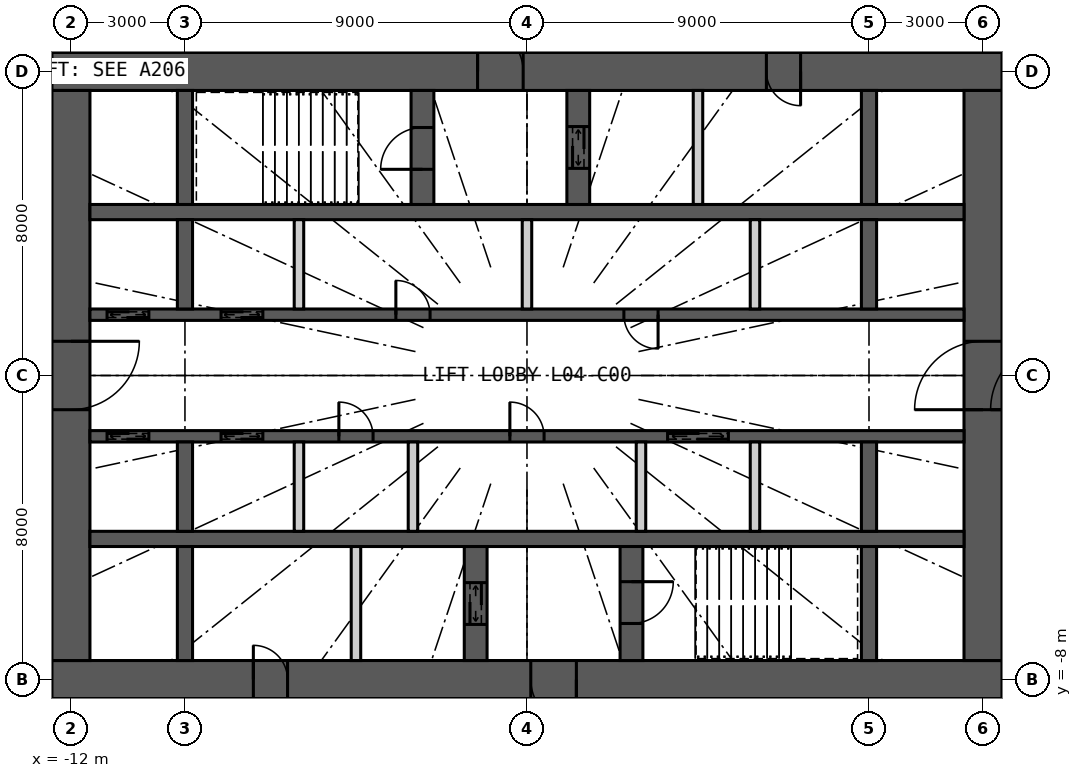
"""IFC4 building model, lengths in metres.
Left out: names, types, materials, properties, quantities, classifications, styles, units other than length and angle.
Written with IfcOpenShell. Run it as: python <this file> out.ifc"""

import sys

from ifc_helpers import new_model, si_unit, direction, frame, frame_2d, origin, place, context, subcontext, project, spatial, rectangle, extrude, element, fill, save


model = new_model("IFC4")
c1 = context("Model", 3, precision=1e-05, world=origin(), true_north=direction((0.0, 1.0)))
c2 = subcontext(c1, "Body", "Model", "MODEL_VIEW")
j1 = project(units=[si_unit("LENGTHUNIT", "METRE"), si_unit("PLANEANGLEUNIT", "RADIAN")], contexts=[c1])
p1 = place(None, origin())
s1 = spatial("IfcSite", under=j1, at=p1, CompositionType="ELEMENT")
p2 = place(p1, origin())
s2 = spatial("IfcBuilding", under=s1, at=p2, CompositionType="ELEMENT")
p3 = place(p2, frame((0.0, 0.0, 24.6)))
s3 = spatial("IfcBuildingStorey", under=s2, at=p3, CompositionType="ELEMENT", Elevation=24.6)
p4 = place(p3, frame((-12.5, 8.0, 0.0), z_axis=(0.0, 0.0, 1.0), x_axis=(1.0, 0.0, 0.0)))
e1 = element("IfcWall", 1, at=p4, inside=s3, PredefinedType="SHEAR", context=c2, shape_type="SweptSolid", body=[
    extrude(rectangle(XDim=25.0, YDim=1.0, at=frame_2d((12.5, 0.0))), origin(), (0.0, 0.0, 1.0), 4.8),
])
p5 = place(p4, frame((11.2, 0.0, 0.0)))
e2 = element("IfcOpeningElement", 2, at=p5, cuts=e1, PredefinedType="OPENING", context=c2, shape_type="SweptSolid", body=[
    extrude(rectangle(XDim=1.2, YDim=2.2, at=frame_2d((0.6, 1.1))), frame((0.0, 0.51, 0.0), z_axis=(0.0, -1.0, 0.0), x_axis=(1.0, 0.0, 0.0)), (0.0, 0.0, 1.0), 1.02),
])
p6 = place(p4, frame((18.8, 0.0, 0.0)))
e3 = element("IfcOpeningElement", 3, at=p6, cuts=e1, PredefinedType="OPENING", context=c2, shape_type="SweptSolid", body=[
    extrude(rectangle(XDim=0.9, YDim=2.2, at=frame_2d((0.45, 1.1))), frame((0.0, 0.51, 0.0), z_axis=(0.0, -1.0, 0.0), x_axis=(1.0, 0.0, 0.0)), (0.0, 0.0, 1.0), 1.02),
])
p7 = place(p3, frame((12.5, -8.0, 0.0), z_axis=(0.0, 0.0, 1.0), x_axis=(-1.0, 0.0, 0.0)))
e4 = element("IfcWall", 4, at=p7, inside=s3, PredefinedType="SHEAR", context=c2, shape_type="SweptSolid", body=[
    extrude(rectangle(XDim=25.0, YDim=1.0, at=frame_2d((12.5, 0.0))), origin(), (0.0, 0.0, 1.0), 4.8),
])
p8 = place(p7, frame((11.2, 0.0, 0.0)))
e5 = element("IfcOpeningElement", 5, at=p8, cuts=e4, PredefinedType="OPENING", context=c2, shape_type="SweptSolid", body=[
    extrude(rectangle(XDim=1.2, YDim=2.2, at=frame_2d((0.6, 1.1))), frame((0.0, 0.51, 0.0), z_axis=(0.0, -1.0, 0.0), x_axis=(1.0, 0.0, 0.0)), (0.0, 0.0, 1.0), 1.02),
])
p9 = place(p7, frame((18.8, 0.0, 0.0)))
e6 = element("IfcOpeningElement", 6, at=p9, cuts=e4, PredefinedType="OPENING", context=c2, shape_type="SweptSolid", body=[
    extrude(rectangle(XDim=0.9, YDim=2.2, at=frame_2d((0.45, 1.1))), frame((0.0, 0.51, 0.0), z_axis=(0.0, -1.0, 0.0), x_axis=(1.0, 0.0, 0.0)), (0.0, 0.0, 1.0), 1.02),
])
p10 = place(p3, frame((12.0, -7.5, 0.0), z_axis=(0.0, 0.0, 1.0), x_axis=(0.0, 1.0, 0.0)))
e7 = element("IfcWall", 7, at=p10, inside=s3, PredefinedType="SHEAR", context=c2, shape_type="SweptSolid", body=[
    extrude(rectangle(XDim=15.0, YDim=1.0, at=frame_2d((7.5, 0.0))), origin(), (0.0, 0.0, 1.0), 4.8),
])
p11 = place(p10, frame((6.6, 0.0, 0.0)))
e8 = element("IfcOpeningElement", 8, at=p11, cuts=e7, PredefinedType="OPENING", context=c2, shape_type="SweptSolid", body=[
    extrude(rectangle(XDim=1.8, YDim=2.2, at=frame_2d((0.9, 1.1))), frame((0.0, 0.51, 0.0), z_axis=(0.0, -1.0, 0.0), x_axis=(1.0, 0.0, 0.0)), (0.0, 0.0, 1.0), 1.02),
])
p12 = place(p3, frame((-12.0, 7.5, 0.0), z_axis=(0.0, 0.0, 1.0), x_axis=(0.0, -1.0, 0.0)))
e9 = element("IfcWall", 9, at=p12, inside=s3, PredefinedType="SHEAR", context=c2, shape_type="SweptSolid", body=[
    extrude(rectangle(XDim=15.0, YDim=1.0, at=frame_2d((7.5, 0.0))), origin(), (0.0, 0.0, 1.0), 4.8),
])
p13 = place(p12, frame((6.6, 0.0, 0.0)))
e10 = element("IfcOpeningElement", 10, at=p13, cuts=e9, PredefinedType="OPENING", context=c2, shape_type="SweptSolid", body=[
    extrude(rectangle(XDim=1.8, YDim=2.2, at=frame_2d((0.9, 1.1))), frame((0.0, 0.51, 0.0), z_axis=(0.0, -1.0, 0.0), x_axis=(1.0, 0.0, 0.0)), (0.0, 0.0, 1.0), 1.02),
])
p14 = place(p3, frame((-11.5, 4.3, 0.0), z_axis=(0.0, 0.0, 1.0), x_axis=(1.0, 0.0, 0.0)))
e11 = element("IfcWall", 11, at=p14, inside=s3, PredefinedType="SHEAR", context=c2, shape_type="SweptSolid", body=[
    extrude(rectangle(XDim=23.0, YDim=0.4, at=frame_2d((11.5, 0.0))), origin(), (0.0, 0.0, 1.0), 4.8),
])
p15 = place(p3, frame((-11.5, 1.6, 0.0), z_axis=(0.0, 0.0, 1.0), x_axis=(1.0, 0.0, 0.0)))
e12 = element("IfcWall", 12, at=p15, inside=s3, PredefinedType="SHEAR", context=c2, shape_type="SweptSolid", body=[
    extrude(rectangle(XDim=23.0, YDim=0.3, at=frame_2d((11.5, 0.0))), origin(), (0.0, 0.0, 1.0), 4.8),
])
p16 = place(p15, frame((0.45, 0.0, 0.0)))
e13 = element("IfcOpeningElement", 13, at=p16, cuts=e12, PredefinedType="OPENING", context=c2, shape_type="SweptSolid", body=[
    extrude(rectangle(XDim=1.1, YDim=2.2, at=frame_2d((0.55, 1.1))), frame((0.0, 0.16, 0.0), z_axis=(0.0, -1.0, 0.0), x_axis=(1.0, 0.0, 0.0)), (0.0, 0.0, 1.0), 0.32),
])
p17 = place(p15, frame((3.45, 0.0, 0.0)))
e14 = element("IfcOpeningElement", 14, at=p17, cuts=e12, PredefinedType="OPENING", context=c2, shape_type="SweptSolid", body=[
    extrude(rectangle(XDim=1.1, YDim=2.2, at=frame_2d((0.55, 1.1))), frame((0.0, 0.16, 0.0), z_axis=(0.0, -1.0, 0.0), x_axis=(1.0, 0.0, 0.0)), (0.0, 0.0, 1.0), 0.32),
])
p18 = place(p15, frame((8.05, 0.0, 0.0)))
e15 = element("IfcOpeningElement", 15, at=p18, cuts=e12, PredefinedType="OPENING", context=c2, shape_type="SweptSolid", body=[
    extrude(rectangle(XDim=0.9, YDim=2.2, at=frame_2d((0.45, 1.1))), frame((0.0, 0.16, 0.0), z_axis=(0.0, -1.0, 0.0), x_axis=(1.0, 0.0, 0.0)), (0.0, 0.0, 1.0), 0.32),
])
p19 = place(p15, frame((14.05, 0.0, 0.0)))
e16 = element("IfcOpeningElement", 16, at=p19, cuts=e12, PredefinedType="OPENING", context=c2, shape_type="SweptSolid", body=[
    extrude(rectangle(XDim=0.9, YDim=2.2, at=frame_2d((0.45, 1.1))), frame((0.0, 0.16, 0.0), z_axis=(0.0, -1.0, 0.0), x_axis=(1.0, 0.0, 0.0)), (0.0, 0.0, 1.0), 0.32),
])
p20 = place(p3, frame((-11.5, -4.3, 0.0), z_axis=(0.0, 0.0, 1.0), x_axis=(1.0, 0.0, 0.0)))
e17 = element("IfcWall", 17, at=p20, inside=s3, PredefinedType="SHEAR", context=c2, shape_type="SweptSolid", body=[
    extrude(rectangle(XDim=23.0, YDim=0.4, at=frame_2d((11.5, 0.0))), origin(), (0.0, 0.0, 1.0), 4.8),
])
p21 = place(p3, frame((-11.5, -1.6, 0.0), z_axis=(0.0, 0.0, 1.0), x_axis=(1.0, 0.0, 0.0)))
e18 = element("IfcWall", 18, at=p21, inside=s3, PredefinedType="SHEAR", context=c2, shape_type="SweptSolid", body=[
    extrude(rectangle(XDim=23.0, YDim=0.3, at=frame_2d((11.5, 0.0))), origin(), (0.0, 0.0, 1.0), 4.8),
])
p22 = place(p21, frame((0.45, 0.0, 0.0)))
e19 = element("IfcOpeningElement", 19, at=p22, cuts=e18, PredefinedType="OPENING", context=c2, shape_type="SweptSolid", body=[
    extrude(rectangle(XDim=1.1, YDim=2.2, at=frame_2d((0.55, 1.1))), frame((0.0, 0.16, 0.0), z_axis=(0.0, -1.0, 0.0), x_axis=(1.0, 0.0, 0.0)), (0.0, 0.0, 1.0), 0.32),
])
p23 = place(p21, frame((3.45, 0.0, 0.0)))
e20 = element("IfcOpeningElement", 20, at=p23, cuts=e18, PredefinedType="OPENING", context=c2, shape_type="SweptSolid", body=[
    extrude(rectangle(XDim=1.1, YDim=2.2, at=frame_2d((0.55, 1.1))), frame((0.0, 0.16, 0.0), z_axis=(0.0, -1.0, 0.0), x_axis=(1.0, 0.0, 0.0)), (0.0, 0.0, 1.0), 0.32),
])
p24 = place(p21, frame((15.2, 0.0, 0.0)))
e21 = element("IfcOpeningElement", 21, at=p24, cuts=e18, PredefinedType="OPENING", context=c2, shape_type="SweptSolid", body=[
    extrude(rectangle(XDim=1.6, YDim=2.4, at=frame_2d((0.8, 1.2))), frame((0.0, 0.16, 0.0), z_axis=(0.0, -1.0, 0.0), x_axis=(1.0, 0.0, 0.0)), (0.0, 0.0, 1.0), 0.32),
])
p25 = place(p21, frame((6.55, 0.0, 0.0)))
e22 = element("IfcOpeningElement", 22, at=p25, cuts=e18, PredefinedType="OPENING", context=c2, shape_type="SweptSolid", body=[
    extrude(rectangle(XDim=0.9, YDim=2.2, at=frame_2d((0.45, 1.1))), frame((0.0, 0.16, 0.0), z_axis=(0.0, -1.0, 0.0), x_axis=(1.0, 0.0, 0.0)), (0.0, 0.0, 1.0), 0.32),
])
p26 = place(p21, frame((11.05, 0.0, 0.0)))
e23 = element("IfcOpeningElement", 23, at=p26, cuts=e18, PredefinedType="OPENING", context=c2, shape_type="SweptSolid", body=[
    extrude(rectangle(XDim=0.9, YDim=2.2, at=frame_2d((0.45, 1.1))), frame((0.0, 0.16, 0.0), z_axis=(0.0, -1.0, 0.0), x_axis=(1.0, 0.0, 0.0)), (0.0, 0.0, 1.0), 0.32),
])
p27 = place(p3, frame((-9.0, 4.5, 0.0), z_axis=(0.0, 0.0, 1.0), x_axis=(0.0, 1.0, 0.0)))
e24 = element("IfcWall", 24, at=p27, inside=s3, PredefinedType="SHEAR", context=c2, shape_type="SweptSolid", body=[
    extrude(rectangle(XDim=3.0, YDim=0.4, at=frame_2d((1.5, 0.0))), origin(), (0.0, 0.0, 1.0), 4.8),
])
for number, where, z_axis, x_axis in (
    (25, (-9.0, 1.75, 0.0), (0.0, 0.0, 1.0), (0.0, 1.0, 0.0)),
    (26, (-9.0, -4.1, 0.0), (0.0, 0.0, 1.0), (0.0, 1.0, 0.0)),
):
    element("IfcWall", number, at=place(p3, frame(where, z_axis=z_axis, x_axis=x_axis)), inside=s3, PredefinedType="SHEAR", context=c2, shape_type="SweptSolid", body=[
        extrude(rectangle(XDim=2.35, YDim=0.4, at=frame_2d((1.175, 0.0))), origin(), (0.0, 0.0, 1.0), 4.8),
    ])
for number, where, z_axis, x_axis in (
    (27, (-9.0, -7.5, 0.0), (0.0, 0.0, 1.0), (0.0, 1.0, 0.0)),
    (28, (9.0, 4.5, 0.0), (0.0, 0.0, 1.0), (0.0, 1.0, 0.0)),
):
    element("IfcWall", number, at=place(p3, frame(where, z_axis=z_axis, x_axis=x_axis)), inside=s3, PredefinedType="SHEAR", context=c2, shape_type="SweptSolid", body=[
        extrude(rectangle(XDim=3.0, YDim=0.4, at=frame_2d((1.5, 0.0))), origin(), (0.0, 0.0, 1.0), 4.8),
    ])
for number, where, z_axis, x_axis in (
    (29, (9.0, 1.75, 0.0), (0.0, 0.0, 1.0), (0.0, 1.0, 0.0)),
    (30, (9.0, -4.1, 0.0), (0.0, 0.0, 1.0), (0.0, 1.0, 0.0)),
):
    element("IfcWall", number, at=place(p3, frame(where, z_axis=z_axis, x_axis=x_axis)), inside=s3, PredefinedType="SHEAR", context=c2, shape_type="SweptSolid", body=[
        extrude(rectangle(XDim=2.35, YDim=0.4, at=frame_2d((1.175, 0.0))), origin(), (0.0, 0.0, 1.0), 4.8),
    ])
p28 = place(p3, frame((9.0, -7.5, 0.0), z_axis=(0.0, 0.0, 1.0), x_axis=(0.0, 1.0, 0.0)))
e31 = element("IfcWall", 31, at=p28, inside=s3, PredefinedType="SHEAR", context=c2, shape_type="SweptSolid", body=[
    extrude(rectangle(XDim=3.0, YDim=0.4, at=frame_2d((1.5, 0.0))), origin(), (0.0, 0.0, 1.0), 4.8),
])
p29 = place(p3, frame((-2.75, 4.5, 0.0), z_axis=(0.0, 0.0, 1.0), x_axis=(0.0, 1.0, 0.0)))
e32 = element("IfcWall", 32, at=p29, inside=s3, PredefinedType="SHEAR", context=c2, shape_type="SweptSolid", body=[
    extrude(rectangle(XDim=3.0, YDim=0.6, at=frame_2d((1.5, 0.0))), origin(), (0.0, 0.0, 1.0), 4.8),
])
p30 = place(p29, frame((0.925, 0.0, 0.0)))
e33 = element("IfcOpeningElement", 33, at=p30, cuts=e32, PredefinedType="OPENING", context=c2, shape_type="SweptSolid", body=[
    extrude(rectangle(XDim=1.1, YDim=2.2, at=frame_2d((0.55, 1.1))), frame((0.0, 0.31, 0.0), z_axis=(0.0, -1.0, 0.0), x_axis=(1.0, 0.0, 0.0)), (0.0, 0.0, 1.0), 0.62),
])
p31 = place(p3, frame((1.35, 4.5, 0.0), z_axis=(0.0, 0.0, 1.0), x_axis=(0.0, 1.0, 0.0)))
e34 = element("IfcWall", 34, at=p31, inside=s3, PredefinedType="SHEAR", context=c2, shape_type="SweptSolid", body=[
    extrude(rectangle(XDim=3.0, YDim=0.6, at=frame_2d((1.5, 0.0))), origin(), (0.0, 0.0, 1.0), 4.8),
])
p32 = place(p31, frame((0.95, 0.0, 0.0)))
e35 = element("IfcOpeningElement", 35, at=p32, cuts=e34, PredefinedType="OPENING", context=c2, shape_type="SweptSolid", body=[
    extrude(rectangle(XDim=1.1, YDim=2.2, at=frame_2d((0.55, 1.1))), frame((0.0, 0.31, 0.0), z_axis=(0.0, -1.0, 0.0), x_axis=(1.0, 0.0, 0.0)), (0.0, 0.0, 1.0), 0.62),
])
p33 = place(p3, frame((4.5, 4.5, 0.0), z_axis=(0.0, 0.0, 1.0), x_axis=(0.0, 1.0, 0.0)))
e36 = element("IfcWall", 36, at=p33, inside=s3, PredefinedType="PARTITIONING", context=c2, shape_type="SweptSolid", body=[
    extrude(rectangle(XDim=3.0, YDim=0.25, at=frame_2d((1.5, 0.0))), origin(), (0.0, 0.0, 1.0), 4.8),
])
p34 = place(p3, frame((2.75, -7.5, 0.0), z_axis=(0.0, 0.0, 1.0), x_axis=(0.0, 1.0, 0.0)))
e37 = element("IfcWall", 37, at=p34, inside=s3, PredefinedType="SHEAR", context=c2, shape_type="SweptSolid", body=[
    extrude(rectangle(XDim=3.0, YDim=0.6, at=frame_2d((1.5, 0.0))), origin(), (0.0, 0.0, 1.0), 4.8),
])
p35 = place(p34, frame((0.975, 0.0, 0.0)))
e38 = element("IfcOpeningElement", 38, at=p35, cuts=e37, PredefinedType="OPENING", context=c2, shape_type="SweptSolid", body=[
    extrude(rectangle(XDim=1.1, YDim=2.2, at=frame_2d((0.55, 1.1))), frame((0.0, 0.31, 0.0), z_axis=(0.0, -1.0, 0.0), x_axis=(1.0, 0.0, 0.0)), (0.0, 0.0, 1.0), 0.62),
])
p36 = place(p3, frame((-1.35, -7.5, 0.0), z_axis=(0.0, 0.0, 1.0), x_axis=(0.0, 1.0, 0.0)))
e39 = element("IfcWall", 39, at=p36, inside=s3, PredefinedType="SHEAR", context=c2, shape_type="SweptSolid", body=[
    extrude(rectangle(XDim=3.0, YDim=0.6, at=frame_2d((1.5, 0.0))), origin(), (0.0, 0.0, 1.0), 4.8),
])
p37 = place(p36, frame((0.95, 0.0, 0.0)))
e40 = element("IfcOpeningElement", 40, at=p37, cuts=e39, PredefinedType="OPENING", context=c2, shape_type="SweptSolid", body=[
    extrude(rectangle(XDim=1.1, YDim=2.2, at=frame_2d((0.55, 1.1))), frame((0.0, 0.31, 0.0), z_axis=(0.0, -1.0, 0.0), x_axis=(1.0, 0.0, 0.0)), (0.0, 0.0, 1.0), 0.62),
])
p38 = place(p3, frame((-4.5, -7.5, 0.0), z_axis=(0.0, 0.0, 1.0), x_axis=(0.0, 1.0, 0.0)))
e41 = element("IfcWall", 41, at=p38, inside=s3, PredefinedType="PARTITIONING", context=c2, shape_type="SweptSolid", body=[
    extrude(rectangle(XDim=3.0, YDim=0.25, at=frame_2d((1.5, 0.0))), origin(), (0.0, 0.0, 1.0), 4.8),
])
for number, where, z_axis, x_axis in (
    (42, (-6.0, 1.75, 0.0), (0.0, 0.0, 1.0), (0.0, 1.0, 0.0)),
    (43, (0.0, 1.75, 0.0), (0.0, 0.0, 1.0), (0.0, 1.0, 0.0)),
    (44, (6.0, 1.75, 0.0), (0.0, 0.0, 1.0), (0.0, 1.0, 0.0)),
    (45, (-6.0, -4.1, 0.0), (0.0, 0.0, 1.0), (0.0, 1.0, 0.0)),
    (46, (-3.0, -4.1, 0.0), (0.0, 0.0, 1.0), (0.0, 1.0, 0.0)),
    (47, (3.0, -4.1, 0.0), (0.0, 0.0, 1.0), (0.0, 1.0, 0.0)),
    (48, (6.0, -4.1, 0.0), (0.0, 0.0, 1.0), (0.0, 1.0, 0.0)),
):
    element("IfcWall", number, at=place(p3, frame(where, z_axis=z_axis, x_axis=x_axis)), inside=s3, PredefinedType="PARTITIONING", context=c2, shape_type="SweptSolid", body=[
        extrude(rectangle(XDim=2.35, YDim=0.25, at=frame_2d((1.175, 0.0))), origin(), (0.0, 0.0, 1.0), 4.8),
    ])
p39 = place(p5, origin())
e49 = element("IfcDoor", 49, at=p39, inside=s3, OperationType="SINGLE_SWING_LEFT", PredefinedType="DOOR", context=c2, shape_type="SweptSolid", body=[
    extrude(rectangle(XDim=1.2, YDim=2.2, at=frame_2d((0.6, 1.1))), frame((0.0, 0.025, 0.0), z_axis=(0.0, -1.0, 0.0), x_axis=(1.0, 0.0, 0.0)), (0.0, 0.0, 1.0), 0.05),
])
fill(e2, e49)
p40 = place(p30, origin())
e50 = element("IfcDoor", 50, at=p40, inside=s3, OperationType="SINGLE_SWING_LEFT", PredefinedType="DOOR", context=c2, shape_type="SweptSolid", body=[
    extrude(rectangle(XDim=1.1, YDim=2.2, at=frame_2d((0.55, 1.1))), frame((0.0, 0.025, 0.0), z_axis=(0.0, -1.0, 0.0), x_axis=(1.0, 0.0, 0.0)), (0.0, 0.0, 1.0), 0.05),
])
fill(e33, e50)
p41 = place(p32, origin())
e51 = element("IfcDoor", 51, at=p41, inside=s3, OperationType="DOUBLE_DOOR_SLIDING", PredefinedType="DOOR", context=c2, shape_type="SweptSolid", body=[
    extrude(rectangle(XDim=1.1, YDim=2.2, at=frame_2d((0.55, 1.1))), frame((0.0, 0.025, 0.0), z_axis=(0.0, -1.0, 0.0), x_axis=(1.0, 0.0, 0.0)), (0.0, 0.0, 1.0), 0.05),
])
fill(e35, e51)
p42 = place(p6, origin())
e52 = element("IfcDoor", 52, at=p42, inside=s3, OperationType="SINGLE_SWING_RIGHT", PredefinedType="DOOR", context=c2, shape_type="SweptSolid", body=[
    extrude(rectangle(XDim=0.9, YDim=2.2, at=frame_2d((0.45, 1.1))), frame((0.0, 0.025, 0.0), z_axis=(0.0, -1.0, 0.0), x_axis=(1.0, 0.0, 0.0)), (0.0, 0.0, 1.0), 0.05),
])
fill(e3, e52)
p43 = place(p8, origin())
e53 = element("IfcDoor", 53, at=p43, inside=s3, OperationType="SINGLE_SWING_LEFT", PredefinedType="DOOR", context=c2, shape_type="SweptSolid", body=[
    extrude(rectangle(XDim=1.2, YDim=2.2, at=frame_2d((0.6, 1.1))), frame((0.0, 0.025, 0.0), z_axis=(0.0, -1.0, 0.0), x_axis=(1.0, 0.0, 0.0)), (0.0, 0.0, 1.0), 0.05),
])
fill(e5, e53)
p44 = place(p35, origin())
e54 = element("IfcDoor", 54, at=p44, inside=s3, OperationType="SINGLE_SWING_RIGHT", PredefinedType="DOOR", context=c2, shape_type="SweptSolid", body=[
    extrude(rectangle(XDim=1.1, YDim=2.2, at=frame_2d((0.55, 1.1))), frame((0.0, 0.025, 0.0), z_axis=(0.0, -1.0, 0.0), x_axis=(1.0, 0.0, 0.0)), (0.0, 0.0, 1.0), 0.05),
])
fill(e38, e54)
p45 = place(p37, origin())
e55 = element("IfcDoor", 55, at=p45, inside=s3, OperationType="DOUBLE_DOOR_SLIDING", PredefinedType="DOOR", context=c2, shape_type="SweptSolid", body=[
    extrude(rectangle(XDim=1.1, YDim=2.2, at=frame_2d((0.55, 1.1))), frame((0.0, 0.025, 0.0), z_axis=(0.0, -1.0, 0.0), x_axis=(1.0, 0.0, 0.0)), (0.0, 0.0, 1.0), 0.05),
])
fill(e40, e55)
p46 = place(p9, origin())
e56 = element("IfcDoor", 56, at=p46, inside=s3, OperationType="SINGLE_SWING_RIGHT", PredefinedType="DOOR", context=c2, shape_type="SweptSolid", body=[
    extrude(rectangle(XDim=0.9, YDim=2.2, at=frame_2d((0.45, 1.1))), frame((0.0, 0.025, 0.0), z_axis=(0.0, -1.0, 0.0), x_axis=(1.0, 0.0, 0.0)), (0.0, 0.0, 1.0), 0.05),
])
fill(e6, e56)
p47 = place(p16, origin())
e57 = element("IfcDoor", 57, at=p47, inside=s3, OperationType="DOUBLE_DOOR_SLIDING", PredefinedType="DOOR", context=c2, shape_type="SweptSolid", body=[
    extrude(rectangle(XDim=1.1, YDim=2.2, at=frame_2d((0.55, 1.1))), frame((0.0, 0.025, 0.0), z_axis=(0.0, -1.0, 0.0), x_axis=(1.0, 0.0, 0.0)), (0.0, 0.0, 1.0), 0.05),
])
fill(e13, e57)
p48 = place(p17, origin())
e58 = element("IfcDoor", 58, at=p48, inside=s3, OperationType="DOUBLE_DOOR_SLIDING", PredefinedType="DOOR", context=c2, shape_type="SweptSolid", body=[
    extrude(rectangle(XDim=1.1, YDim=2.2, at=frame_2d((0.55, 1.1))), frame((0.0, 0.025, 0.0), z_axis=(0.0, -1.0, 0.0), x_axis=(1.0, 0.0, 0.0)), (0.0, 0.0, 1.0), 0.05),
])
fill(e14, e58)
p49 = place(p22, origin())
e59 = element("IfcDoor", 59, at=p49, inside=s3, OperationType="DOUBLE_DOOR_SLIDING", PredefinedType="DOOR", context=c2, shape_type="SweptSolid", body=[
    extrude(rectangle(XDim=1.1, YDim=2.2, at=frame_2d((0.55, 1.1))), frame((0.0, 0.025, 0.0), z_axis=(0.0, -1.0, 0.0), x_axis=(1.0, 0.0, 0.0)), (0.0, 0.0, 1.0), 0.05),
])
fill(e19, e59)
p50 = place(p23, origin())
e60 = element("IfcDoor", 60, at=p50, inside=s3, OperationType="DOUBLE_DOOR_SLIDING", PredefinedType="DOOR", context=c2, shape_type="SweptSolid", body=[
    extrude(rectangle(XDim=1.1, YDim=2.2, at=frame_2d((0.55, 1.1))), frame((0.0, 0.025, 0.0), z_axis=(0.0, -1.0, 0.0), x_axis=(1.0, 0.0, 0.0)), (0.0, 0.0, 1.0), 0.05),
])
fill(e20, e60)
p51 = place(p24, origin())
e61 = element("IfcDoor", 61, at=p51, inside=s3, OperationType="DOUBLE_DOOR_SLIDING", PredefinedType="DOOR", context=c2, shape_type="SweptSolid", body=[
    extrude(rectangle(XDim=1.6, YDim=2.4, at=frame_2d((0.8, 1.2))), frame((0.0, 0.025, 0.0), z_axis=(0.0, -1.0, 0.0), x_axis=(1.0, 0.0, 0.0)), (0.0, 0.0, 1.0), 0.05),
])
fill(e21, e61)
p52 = place(p18, origin())
e62 = element("IfcDoor", 62, at=p52, inside=s3, OperationType="SINGLE_SWING_LEFT", PredefinedType="DOOR", context=c2, shape_type="SweptSolid", body=[
    extrude(rectangle(XDim=0.9, YDim=2.2, at=frame_2d((0.45, 1.1))), frame((0.0, 0.025, 0.0), z_axis=(0.0, -1.0, 0.0), x_axis=(1.0, 0.0, 0.0)), (0.0, 0.0, 1.0), 0.05),
])
fill(e15, e62)
p53 = place(p19, origin())
e63 = element("IfcDoor", 63, at=p53, inside=s3, OperationType="SINGLE_SWING_RIGHT", PredefinedType="DOOR", context=c2, shape_type="SweptSolid", body=[
    extrude(rectangle(XDim=0.9, YDim=2.2, at=frame_2d((0.45, 1.1))), frame((0.0, 0.025, 0.0), z_axis=(0.0, -1.0, 0.0), x_axis=(1.0, 0.0, 0.0)), (0.0, 0.0, 1.0), 0.05),
])
fill(e16, e63)
p54 = place(p25, origin())
e64 = element("IfcDoor", 64, at=p54, inside=s3, OperationType="SINGLE_SWING_LEFT", PredefinedType="DOOR", context=c2, shape_type="SweptSolid", body=[
    extrude(rectangle(XDim=0.9, YDim=2.2, at=frame_2d((0.45, 1.1))), frame((0.0, 0.025, 0.0), z_axis=(0.0, -1.0, 0.0), x_axis=(1.0, 0.0, 0.0)), (0.0, 0.0, 1.0), 0.05),
])
fill(e22, e64)
p55 = place(p26, origin())
e65 = element("IfcDoor", 65, at=p55, inside=s3, OperationType="SINGLE_SWING_LEFT", PredefinedType="DOOR", context=c2, shape_type="SweptSolid", body=[
    extrude(rectangle(XDim=0.9, YDim=2.2, at=frame_2d((0.45, 1.1))), frame((0.0, 0.025, 0.0), z_axis=(0.0, -1.0, 0.0), x_axis=(1.0, 0.0, 0.0)), (0.0, 0.0, 1.0), 0.05),
])
fill(e23, e65)
p56 = place(p11, origin())
e66 = element("IfcDoor", 66, at=p56, inside=s3, OperationType="DOUBLE_DOOR_DOUBLE_SWING", PredefinedType="DOOR", context=c2, shape_type="SweptSolid", body=[
    extrude(rectangle(XDim=1.8, YDim=2.2, at=frame_2d((0.9, 1.1))), frame((0.0, 0.025, 0.0), z_axis=(0.0, -1.0, 0.0), x_axis=(1.0, 0.0, 0.0)), (0.0, 0.0, 1.0), 0.05),
])
fill(e8, e66)
p57 = place(p13, origin())
e67 = element("IfcDoor", 67, at=p57, inside=s3, OperationType="DOUBLE_DOOR_DOUBLE_SWING", PredefinedType="DOOR", context=c2, shape_type="SweptSolid", body=[
    extrude(rectangle(XDim=1.8, YDim=2.2, at=frame_2d((0.9, 1.1))), frame((0.0, 0.025, 0.0), z_axis=(0.0, -1.0, 0.0), x_axis=(1.0, 0.0, 0.0)), (0.0, 0.0, 1.0), 0.05),
])
fill(e10, e67)
save(model, sys.argv[1])
